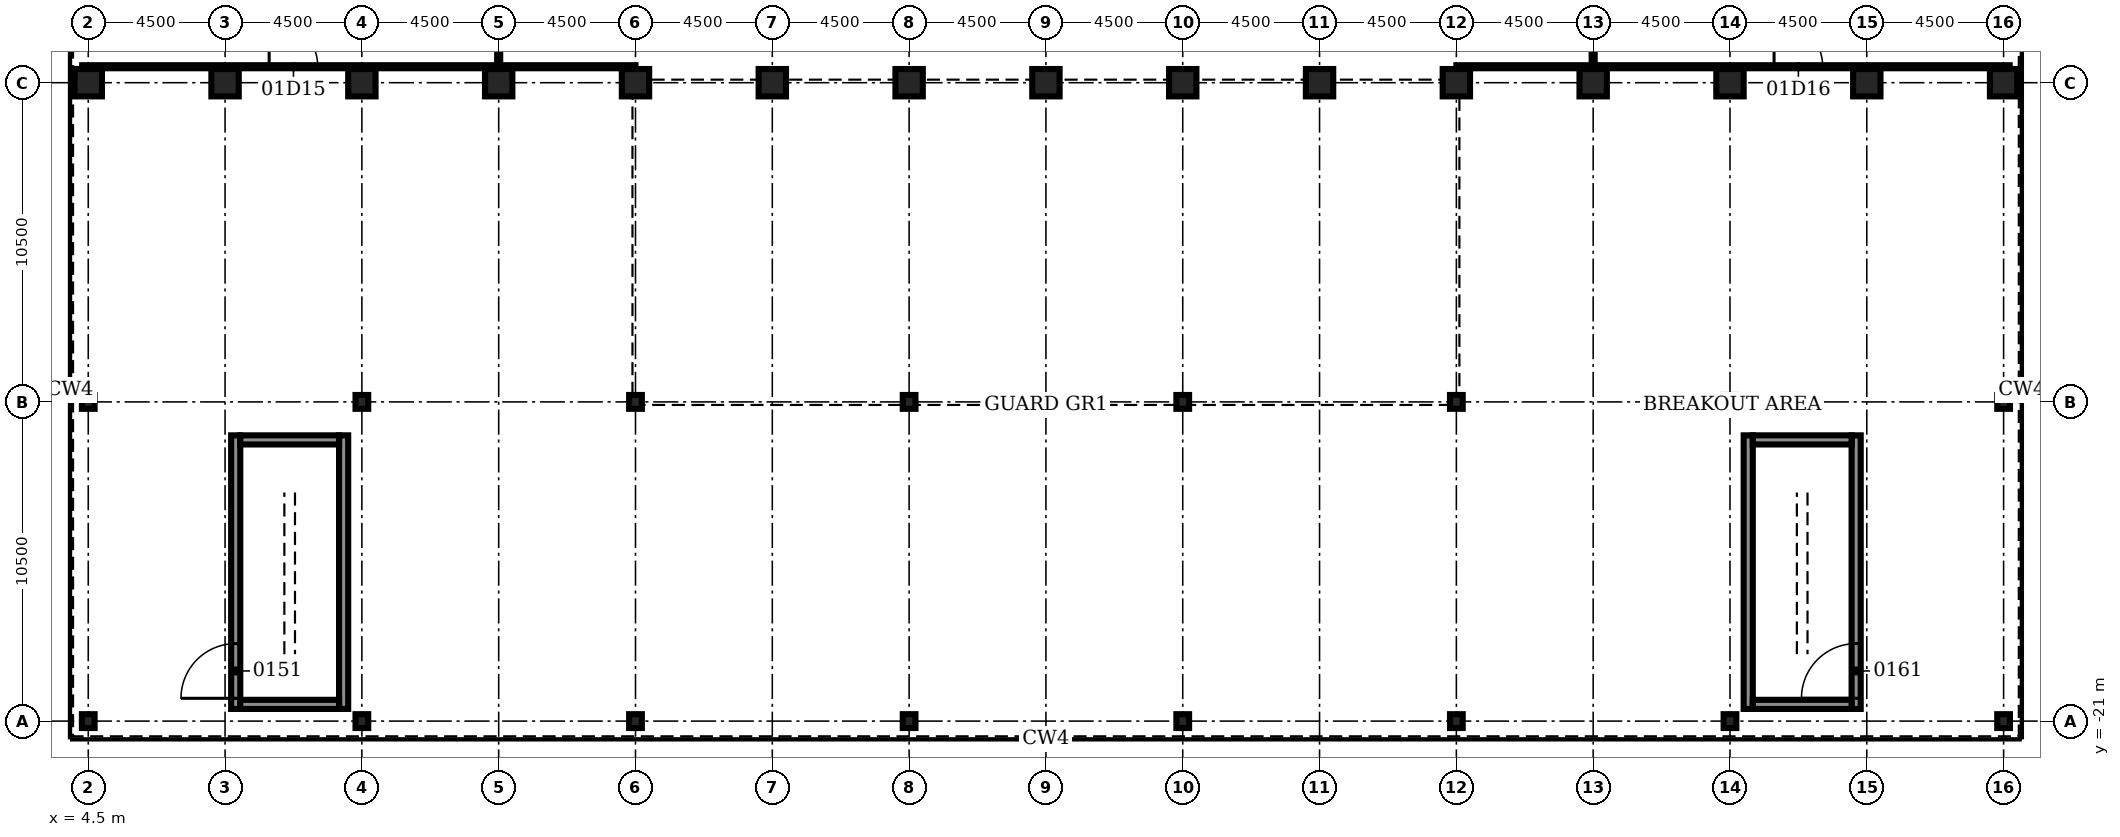
"""IFC4 building model, lengths in metres.
Left out: names, types, materials, properties, quantities, classifications, styles, units other than length and angle.
Written with IfcOpenShell. Run it as: python <this file> out.ifc"""

import sys

from ifc_helpers import new_model, si_unit, direction, frame, frame_2d, origin, origin_2d, place, context, subcontext, project, spatial, rectangle, hollow_rectangle, i_section, extrude, element, fill, save


model = new_model("IFC4")
c1 = context("Model", 3, precision=1e-05, world=origin(), true_north=direction((0.0, 1.0)))
c2 = subcontext(c1, "Body", "Model", "MODEL_VIEW")
j1 = project(units=[si_unit("LENGTHUNIT", "METRE"), si_unit("PLANEANGLEUNIT", "RADIAN")], contexts=[c1])
p1 = place(None, origin())
s1 = spatial("IfcSite", under=j1, at=p1, CompositionType="ELEMENT")
p2 = place(p1, origin())
s2 = spatial("IfcBuilding", under=s1, at=p2, CompositionType="ELEMENT")
p3 = place(p2, frame((0.0, 0.0, 6.0)))
s3 = spatial("IfcBuildingStorey", under=s2, at=p3, CompositionType="ELEMENT", Elevation=6.0)
for number, where, z_axis, x_axis in (
    (1, (4.5, 0.0, 0.0), (0.0, 0.0, 1.0), (0.0, 1.0, 0.0)),
    (2, (9.0, 0.0, 0.0), (0.0, 0.0, 1.0), (0.0, 1.0, 0.0)),
    (3, (13.5, 0.0, 0.0), (0.0, 0.0, 1.0), (0.0, 1.0, 0.0)),
    (4, (18.0, 0.0, 0.0), (0.0, 0.0, 1.0), (0.0, 1.0, 0.0)),
    (5, (22.5, 0.0, 0.0), (0.0, 0.0, 1.0), (0.0, 1.0, 0.0)),
    (6, (27.0, 0.0, 0.0), (0.0, 0.0, 1.0), (0.0, 1.0, 0.0)),
    (7, (31.5, 0.0, 0.0), (0.0, 0.0, 1.0), (0.0, 1.0, 0.0)),
    (8, (36.0, 0.0, 0.0), (0.0, 0.0, 1.0), (0.0, 1.0, 0.0)),
    (9, (40.5, 0.0, 0.0), (0.0, 0.0, 1.0), (0.0, 1.0, 0.0)),
    (10, (45.0, 0.0, 0.0), (0.0, 0.0, 1.0), (0.0, 1.0, 0.0)),
    (11, (49.5, 0.0, 0.0), (0.0, 0.0, 1.0), (0.0, 1.0, 0.0)),
    (12, (54.0, 0.0, 0.0), (0.0, 0.0, 1.0), (0.0, 1.0, 0.0)),
    (13, (58.5, 0.0, 0.0), (0.0, 0.0, 1.0), (0.0, 1.0, 0.0)),
    (14, (63.0, 0.0, 0.0), (0.0, 0.0, 1.0), (0.0, 1.0, 0.0)),
    (15, (67.5, 0.0, 0.0), (0.0, 0.0, 1.0), (0.0, 1.0, 0.0)),
):
    element("IfcColumn", number, at=place(p3, frame(where, z_axis=z_axis, x_axis=x_axis)), inside=s3, PredefinedType="COLUMN", context=c2, shape_type="SweptSolid", body=[
        extrude(hollow_rectangle(XDim=0.9, YDim=0.9, WallThickness=0.12, at=origin_2d()), origin(), (0.0, 0.0, 1.0), 7.0),
    ])
for number, where, z_axis, x_axis in (
    (16, (4.5, -21.0, 0.0), (0.0, 0.0, 1.0), (1.0, 0.0, 0.0)),
    (17, (4.5, -10.5, 0.0), (0.0, 0.0, 1.0), (1.0, 0.0, 0.0)),
    (18, (13.5, -21.0, 0.0), (0.0, 0.0, 1.0), (1.0, 0.0, 0.0)),
    (19, (13.5, -10.5, 0.0), (0.0, 0.0, 1.0), (1.0, 0.0, 0.0)),
    (20, (22.5, -21.0, 0.0), (0.0, 0.0, 1.0), (1.0, 0.0, 0.0)),
    (21, (22.5, -10.5, 0.0), (0.0, 0.0, 1.0), (1.0, 0.0, 0.0)),
    (22, (31.5, -21.0, 0.0), (0.0, 0.0, 1.0), (1.0, 0.0, 0.0)),
    (23, (31.5, -10.5, 0.0), (0.0, 0.0, 1.0), (1.0, 0.0, 0.0)),
    (24, (40.5, -21.0, 0.0), (0.0, 0.0, 1.0), (1.0, 0.0, 0.0)),
    (25, (40.5, -10.5, 0.0), (0.0, 0.0, 1.0), (1.0, 0.0, 0.0)),
    (26, (49.5, -21.0, 0.0), (0.0, 0.0, 1.0), (1.0, 0.0, 0.0)),
    (27, (49.5, -10.5, 0.0), (0.0, 0.0, 1.0), (1.0, 0.0, 0.0)),
    (28, (58.5, -21.0, 0.0), (0.0, 0.0, 1.0), (1.0, 0.0, 0.0)),
    (29, (58.5, -10.5, 0.0), (0.0, 0.0, 1.0), (1.0, 0.0, 0.0)),
    (30, (67.5, -21.0, 0.0), (0.0, 0.0, 1.0), (1.0, 0.0, 0.0)),
    (31, (67.5, -10.5, 0.0), (0.0, 0.0, 1.0), (1.0, 0.0, 0.0)),
):
    element("IfcColumn", number, at=place(p3, frame(where, z_axis=z_axis, x_axis=x_axis)), inside=s3, PredefinedType="COLUMN", context=c2, shape_type="SweptSolid", body=[
        extrude(i_section(OverallWidth=0.418, OverallDepth=0.455, WebThickness=0.042, FlangeThickness=0.068, at=origin_2d()), origin(), (0.0, 0.0, 1.0), 7.0),
    ])
p4 = place(p3, frame((18.0, 0.575, 0.0), z_axis=(0.0, 0.0, 1.0), x_axis=(0.0, 1.0, 0.0)))
e32 = element("IfcWall", 32, at=p4, inside=s3, PredefinedType="PARTITIONING", context=c2, shape_type="SweptSolid", body=[
    extrude(rectangle(XDim=14.975, YDim=0.1, at=frame_2d((7.488, 0.0))), origin(), (0.0, 0.0, 1.0), 3.0),
])
p5 = place(p4, frame((2.944, 0.0, 0.0)))
e33 = element("IfcOpeningElement", 33, at=p5, cuts=e32, PredefinedType="OPENING", context=c2, shape_type="SweptSolid", body=[
    extrude(rectangle(XDim=1.6, YDim=2.1, at=frame_2d((0.8, 1.05))), frame((0.0, 0.06, 0.0), z_axis=(0.0, -1.0, 0.0), x_axis=(1.0, 0.0, 0.0)), (0.0, 0.0, 1.0), 0.12),
])
p6 = place(p4, frame((10.431, 0.0, 0.0)))
e34 = element("IfcOpeningElement", 34, at=p6, cuts=e32, PredefinedType="OPENING", context=c2, shape_type="SweptSolid", body=[
    extrude(rectangle(XDim=1.6, YDim=2.1, at=frame_2d((0.8, 1.05))), frame((0.0, 0.06, 0.0), z_axis=(0.0, -1.0, 0.0), x_axis=(1.0, 0.0, 0.0)), (0.0, 0.0, 1.0), 0.12),
])
p7 = place(p3, frame((54.0, 0.575, 0.0), z_axis=(0.0, 0.0, 1.0), x_axis=(0.0, 1.0, 0.0)))
e35 = element("IfcWall", 35, at=p7, inside=s3, PredefinedType="PARTITIONING", context=c2, shape_type="SweptSolid", body=[
    extrude(rectangle(XDim=14.975, YDim=0.1, at=frame_2d((7.488, 0.0))), origin(), (0.0, 0.0, 1.0), 3.0),
])
p8 = place(p7, frame((2.944, 0.0, 0.0)))
e36 = element("IfcOpeningElement", 36, at=p8, cuts=e35, PredefinedType="OPENING", context=c2, shape_type="SweptSolid", body=[
    extrude(rectangle(XDim=1.6, YDim=2.1, at=frame_2d((0.8, 1.05))), frame((0.0, 0.06, 0.0), z_axis=(0.0, -1.0, 0.0), x_axis=(1.0, 0.0, 0.0)), (0.0, 0.0, 1.0), 0.12),
])
p9 = place(p7, frame((10.431, 0.0, 0.0)))
e37 = element("IfcOpeningElement", 37, at=p9, cuts=e35, PredefinedType="OPENING", context=c2, shape_type="SweptSolid", body=[
    extrude(rectangle(XDim=1.6, YDim=2.1, at=frame_2d((0.8, 1.05))), frame((0.0, 0.06, 0.0), z_axis=(0.0, -1.0, 0.0), x_axis=(1.0, 0.0, 0.0)), (0.0, 0.0, 1.0), 0.12),
])
p10 = place(p3, frame((4.3, 0.525, 0.0), z_axis=(0.0, 0.0, 1.0), x_axis=(1.0, 0.0, 0.0)))
e38 = element("IfcWall", 38, at=p10, inside=s3, PredefinedType="PARTITIONING", context=c2, shape_type="SweptSolid", body=[
    extrude(rectangle(XDim=18.2, YDim=0.1, at=frame_2d((9.1, 0.0))), origin(), (0.0, 0.0, 1.0), 3.0),
])
p11 = place(p10, frame((6.15, 0.0, 0.0)))
e39 = element("IfcOpeningElement", 39, at=p11, cuts=e38, PredefinedType="OPENING", context=c2, shape_type="SweptSolid", body=[
    extrude(rectangle(XDim=1.6, YDim=2.1, at=frame_2d((0.8, 1.05))), frame((0.0, 0.06, 0.0), z_axis=(0.0, -1.0, 0.0), x_axis=(1.0, 0.0, 0.0)), (0.0, 0.0, 1.0), 0.12),
])
p12 = place(p3, frame((49.5, 0.525, 0.0), z_axis=(0.0, 0.0, 1.0), x_axis=(1.0, 0.0, 0.0)))
e40 = element("IfcWall", 40, at=p12, inside=s3, PredefinedType="PARTITIONING", context=c2, shape_type="SweptSolid", body=[
    extrude(rectangle(XDim=18.2, YDim=0.1, at=frame_2d((9.1, 0.0))), origin(), (0.0, 0.0, 1.0), 3.0),
])
p13 = place(p12, frame((10.45, 0.0, 0.0)))
e41 = element("IfcOpeningElement", 41, at=p13, cuts=e40, PredefinedType="OPENING", context=c2, shape_type="SweptSolid", body=[
    extrude(rectangle(XDim=1.6, YDim=2.1, at=frame_2d((0.8, 1.05))), frame((0.0, 0.06, 0.0), z_axis=(0.0, -1.0, 0.0), x_axis=(1.0, 0.0, 0.0)), (0.0, 0.0, 1.0), 0.12),
])
p14 = place(p3, frame((9.35, -20.6, 0.0), z_axis=(0.0, 0.0, 1.0), x_axis=(0.0, 1.0, 0.0)))
e42 = element("IfcWall", 42, at=p14, inside=s3, PredefinedType="SOLIDWALL", context=c2, shape_type="SweptSolid", body=[
    extrude(rectangle(XDim=9.0, YDim=0.3, at=frame_2d((4.5, 0.0))), origin(), (0.0, 0.0, 1.0), 7.0),
])
p15 = place(p14, frame((0.35, 0.0, 0.0)))
e43 = element("IfcOpeningElement", 43, at=p15, cuts=e42, PredefinedType="OPENING", context=c2, shape_type="SweptSolid", body=[
    extrude(rectangle(XDim=1.8, YDim=2.1, at=frame_2d((0.9, 1.05))), frame((0.0, 0.16, 0.0), z_axis=(0.0, -1.0, 0.0), x_axis=(1.0, 0.0, 0.0)), (0.0, 0.0, 1.0), 0.32),
])
p16 = place(p3, frame((12.9, -20.6, 0.0), z_axis=(0.0, 0.0, 1.0), x_axis=(0.0, 1.0, 0.0)))
e44 = element("IfcWall", 44, at=p16, inside=s3, PredefinedType="SOLIDWALL", context=c2, shape_type="SweptSolid", body=[
    extrude(rectangle(XDim=9.0, YDim=0.3, at=frame_2d((4.5, 0.0))), origin(), (0.0, 0.0, 1.0), 7.0),
])
for number, where, z_axis, x_axis in (
    (45, (9.5, -20.45, 0.0), (0.0, 0.0, 1.0), (1.0, 0.0, 0.0)),
    (46, (9.5, -11.75, 0.0), (0.0, 0.0, 1.0), (1.0, 0.0, 0.0)),
):
    element("IfcWall", number, at=place(p3, frame(where, z_axis=z_axis, x_axis=x_axis)), inside=s3, PredefinedType="SOLIDWALL", context=c2, shape_type="SweptSolid", body=[
        extrude(rectangle(XDim=3.25, YDim=0.3, at=frame_2d((1.625, 0.0))), origin(), (0.0, 0.0, 1.0), 7.0),
    ])
p17 = place(p3, frame((59.1, -20.6, 0.0), z_axis=(0.0, 0.0, 1.0), x_axis=(0.0, 1.0, 0.0)))
e47 = element("IfcWall", 47, at=p17, inside=s3, PredefinedType="SOLIDWALL", context=c2, shape_type="SweptSolid", body=[
    extrude(rectangle(XDim=9.0, YDim=0.3, at=frame_2d((4.5, 0.0))), origin(), (0.0, 0.0, 1.0), 7.0),
])
p18 = place(p3, frame((62.65, -20.6, 0.0), z_axis=(0.0, 0.0, 1.0), x_axis=(0.0, 1.0, 0.0)))
e48 = element("IfcWall", 48, at=p18, inside=s3, PredefinedType="SOLIDWALL", context=c2, shape_type="SweptSolid", body=[
    extrude(rectangle(XDim=9.0, YDim=0.3, at=frame_2d((4.5, 0.0))), origin(), (0.0, 0.0, 1.0), 7.0),
])
p19 = place(p18, frame((0.35, 0.0, 0.0)))
e49 = element("IfcOpeningElement", 49, at=p19, cuts=e48, PredefinedType="OPENING", context=c2, shape_type="SweptSolid", body=[
    extrude(rectangle(XDim=1.8, YDim=2.1, at=frame_2d((0.9, 1.05))), frame((0.0, 0.16, 0.0), z_axis=(0.0, -1.0, 0.0), x_axis=(1.0, 0.0, 0.0)), (0.0, 0.0, 1.0), 0.32),
])
for number, where, z_axis, x_axis in (
    (50, (59.25, -20.45, 0.0), (0.0, 0.0, 1.0), (1.0, 0.0, 0.0)),
    (51, (59.25, -11.75, 0.0), (0.0, 0.0, 1.0), (1.0, 0.0, 0.0)),
):
    element("IfcWall", number, at=place(p3, frame(where, z_axis=z_axis, x_axis=x_axis)), inside=s3, PredefinedType="SOLIDWALL", context=c2, shape_type="SweptSolid", body=[
        extrude(rectangle(XDim=3.25, YDim=0.3, at=frame_2d((1.625, 0.0))), origin(), (0.0, 0.0, 1.0), 7.0),
    ])
p20 = place(p11, origin())
e52 = element("IfcDoor", 52, at=p20, inside=s3, OperationType="SINGLE_SWING_LEFT", PredefinedType="DOOR", context=c2, shape_type="SweptSolid", body=[
    extrude(rectangle(XDim=1.6, YDim=2.1, at=frame_2d((0.8, 1.05))), frame((0.0, 0.025, 0.0), z_axis=(0.0, -1.0, 0.0), x_axis=(1.0, 0.0, 0.0)), (0.0, 0.0, 1.0), 0.05),
])
fill(e39, e52)
p21 = place(p13, origin())
e53 = element("IfcDoor", 53, at=p21, inside=s3, OperationType="SINGLE_SWING_LEFT", PredefinedType="DOOR", context=c2, shape_type="SweptSolid", body=[
    extrude(rectangle(XDim=1.6, YDim=2.1, at=frame_2d((0.8, 1.05))), frame((0.0, 0.025, 0.0), z_axis=(0.0, -1.0, 0.0), x_axis=(1.0, 0.0, 0.0)), (0.0, 0.0, 1.0), 0.05),
])
fill(e41, e53)
p22 = place(p15, origin())
e54 = element("IfcDoor", 54, at=p22, inside=s3, OperationType="SINGLE_SWING_LEFT", PredefinedType="DOOR", context=c2, shape_type="SweptSolid", body=[
    extrude(rectangle(XDim=1.8, YDim=2.1, at=frame_2d((0.9, 1.05))), frame((0.0, 0.025, 0.0), z_axis=(0.0, -1.0, 0.0), x_axis=(1.0, 0.0, 0.0)), (0.0, 0.0, 1.0), 0.05),
])
fill(e43, e54)
p23 = place(p19, origin())
e55 = element("IfcDoor", 55, at=p23, inside=s3, OperationType="SINGLE_SWING_LEFT", PredefinedType="DOOR", context=c2, shape_type="SweptSolid", body=[
    extrude(rectangle(XDim=1.8, YDim=2.1, at=frame_2d((0.9, 1.05))), frame((0.0, 0.025, 0.0), z_axis=(0.0, -1.0, 0.0), x_axis=(1.0, 0.0, 0.0)), (0.0, 0.0, 1.0), 0.05),
])
fill(e49, e55)
save(model, sys.argv[1])
